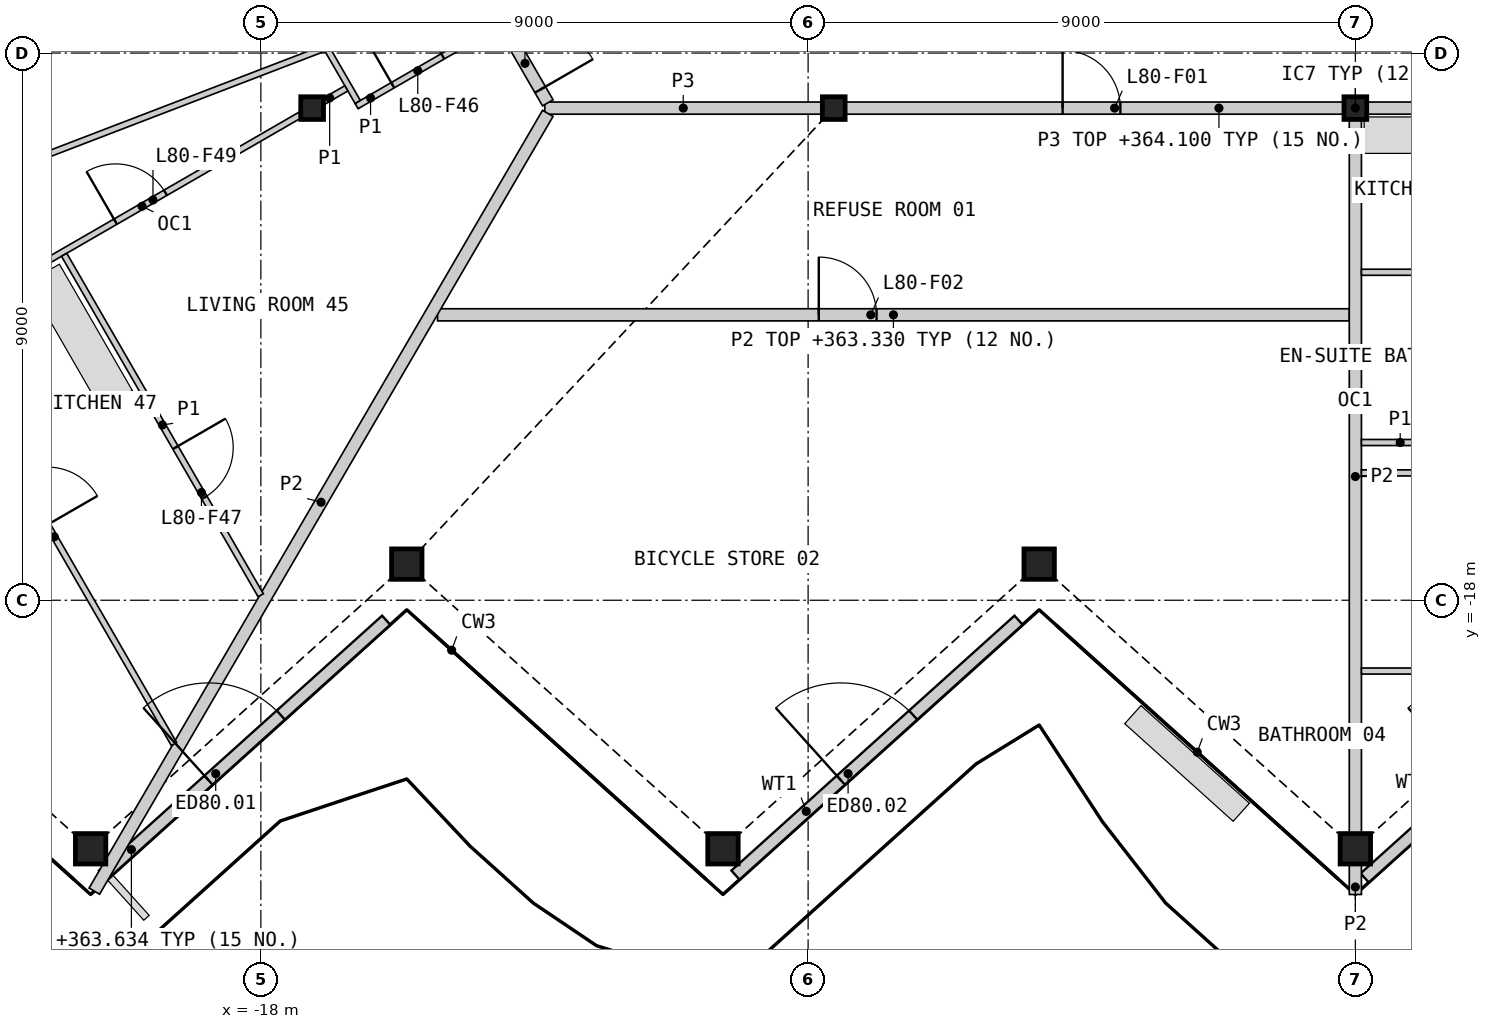
"""IFC4 building model, lengths in metres.
Left out: names, types, materials, properties, quantities, classifications, styles, units other than length and angle.
Written with IfcOpenShell. Run it as: python <this file> out.ifc"""

import sys

from ifc_helpers import new_model, si_unit, direction, frame, frame_2d, origin, origin_2d, place, context, subcontext, project, spatial, rectangle, hollow_rectangle, i_section, extrude, element, fill, save


model = new_model("IFC4")
c1 = context("Model", 3, precision=1e-05, world=origin(), true_north=direction((0.0, 1.0)))
c2 = subcontext(c1, "Body", "Model", "MODEL_VIEW")
j1 = project(units=[si_unit("LENGTHUNIT", "METRE"), si_unit("PLANEANGLEUNIT", "RADIAN")], contexts=[c1])
p1 = place(None, origin())
s1 = spatial("IfcSite", under=j1, at=p1, CompositionType="ELEMENT")
p2 = place(p1, origin())
s2 = spatial("IfcBuilding", under=s1, at=p2, CompositionType="ELEMENT")
p3 = place(p2, frame((0.0, 0.0, 361.0)))
s3 = spatial("IfcBuildingStorey", under=s2, at=p3, CompositionType="ELEMENT", Elevation=361.0)
for number, where, z_axis, x_axis in (
    (1, (-20.8, -22.088, 0.0), (0.0, 0.0, 1.0), (1.0, 0.0, 0.0)),
    (2, (-15.6, -17.406, 0.0), (0.0, 0.0, 1.0), (1.0, 0.0, 0.0)),
    (3, (-10.4, -22.088, 0.0), (0.0, 0.0, 1.0), (1.0, 0.0, 0.0)),
    (4, (-5.2, -17.406, 0.0), (0.0, 0.0, 1.0), (1.0, 0.0, 0.0)),
    (5, (0.0, -22.088, 0.0), (0.0, 0.0, 1.0), (1.0, 0.0, 0.0)),
):
    element("IfcColumn", number, at=place(p3, frame(where, z_axis=z_axis, x_axis=x_axis)), inside=s3, PredefinedType="COLUMN", context=c2, shape_type="SweptSolid", body=[
        extrude(hollow_rectangle(XDim=0.5, YDim=0.5, WallThickness=0.03, at=origin_2d()), origin(), (0.0, 0.0, 1.0), 3.4),
    ])
for number, where, z_axis, x_axis in (
    (6, (-17.157, -9.906, 0.0), (0.0, 0.0, 1.0), (1.0, 0.0, 0.0)),
    (7, (-8.578, -9.906, 0.0), (0.0, 0.0, 1.0), (1.0, 0.0, 0.0)),
    (8, (0.0, -9.906, 0.0), (0.0, 0.0, 1.0), (1.0, 0.0, 0.0)),
):
    element("IfcColumn", number, at=place(p3, frame(where, z_axis=z_axis, x_axis=x_axis)), inside=s3, PredefinedType="COLUMN", context=c2, shape_type="SweptSolid", body=[
        extrude(i_section(OverallWidth=0.374, OverallDepth=0.372, WebThickness=0.016, FlangeThickness=0.026, at=origin_2d()), origin(), (0.0, 0.0, 1.0), 3.4),
    ])
p4 = place(p3, frame((-20.595, -22.52, 0.0), z_axis=(0.0, 0.0, 1.0), x_axis=(0.743137181878, 0.669139095339, 0.0)))
e9 = element("IfcWall", 9, at=p4, inside=s3, PredefinedType="SOLIDWALL", context=c2, shape_type="SweptSolid", body=[
    extrude(rectangle(XDim=6.265, YDim=0.2, at=frame_2d((3.133, 0.0))), origin(), (0.0, 0.0, 1.0), 2.634),
])
p5 = place(p4, frame((2.333, 0.0, 0.0)))
e10 = element("IfcOpeningElement", 10, at=p5, cuts=e9, PredefinedType="OPENING", context=c2, shape_type="SweptSolid", body=[
    extrude(rectangle(XDim=1.6, YDim=2.25, at=frame_2d((0.8, 1.125))), frame((0.0, 0.11, 0.0), z_axis=(0.0, -1.0, 0.0), x_axis=(1.0, 0.0, 0.0)), (0.0, 0.0, 1.0), 0.22),
])
p6 = place(p3, frame((-10.195, -22.52, 0.0), z_axis=(0.0, 0.0, 1.0), x_axis=(0.743137181878, 0.669139095339, 0.0)))
e11 = element("IfcWall", 11, at=p6, inside=s3, PredefinedType="SOLIDWALL", context=c2, shape_type="SweptSolid", body=[
    extrude(rectangle(XDim=6.265, YDim=0.2, at=frame_2d((3.133, 0.0))), origin(), (0.0, 0.0, 1.0), 2.634),
])
p7 = place(p6, frame((2.333, 0.0, 0.0)))
e12 = element("IfcOpeningElement", 12, at=p7, cuts=e11, PredefinedType="OPENING", context=c2, shape_type="SweptSolid", body=[
    extrude(rectangle(XDim=1.6, YDim=2.25, at=frame_2d((0.8, 1.125))), frame((0.0, 0.11, 0.0), z_axis=(0.0, -1.0, 0.0), x_axis=(1.0, 0.0, 0.0)), (0.0, 0.0, 1.0), 0.22),
])
p8 = place(p3, frame((0.154, -22.567, 0.0), z_axis=(0.0, 0.0, 1.0), x_axis=(0.743150529995, 0.669124270796, 0.0)))
e13 = element("IfcWall", 13, at=p8, inside=s3, PredefinedType="SOLIDWALL", context=c2, shape_type="SweptSolid", body=[
    extrude(rectangle(XDim=6.678, YDim=0.2, at=frame_2d((3.339, 0.0))), origin(), (0.0, 0.0, 1.0), 2.634),
])
p9 = place(p8, frame((2.402, 0.0, 0.0)))
e14 = element("IfcOpeningElement", 14, at=p9, cuts=e13, PredefinedType="OPENING", context=c2, shape_type="SweptSolid", body=[
    extrude(rectangle(XDim=1.6, YDim=2.25, at=frame_2d((0.8, 1.125))), frame((0.0, 0.11, 0.0), z_axis=(0.0, -1.0, 0.0), x_axis=(1.0, 0.0, 0.0)), (0.0, 0.0, 1.0), 0.22),
])
p10 = place(p3, frame((-8.382, -9.906, 0.0), z_axis=(0.0, 0.0, 1.0), x_axis=(1.0, 0.0, 0.0)))
e15 = element("IfcWall", 15, at=p10, inside=s3, PredefinedType="PARTITIONING", context=c2, shape_type="SweptSolid", body=[
    extrude(rectangle(XDim=8.185, YDim=0.2, at=frame_2d((4.092, 0.0))), origin(), (0.0, 0.0, 1.0), 3.1),
])
p11 = place(p10, frame((3.567, 0.0, 0.0)))
e16 = element("IfcOpeningElement", 16, at=p11, cuts=e15, PredefinedType="OPENING", context=c2, shape_type="SweptSolid", body=[
    extrude(rectangle(XDim=0.95, YDim=2.1, at=frame_2d((0.475, 1.05))), frame((0.0, 0.11, 0.0), z_axis=(0.0, -1.0, 0.0), x_axis=(1.0, 0.0, 0.0)), (0.0, 0.0, 1.0), 0.22),
])
p12 = place(p3, frame((0.197, -9.906, 0.0), z_axis=(0.0, 0.0, 1.0), x_axis=(1.0, 0.0, 0.0)))
e17 = element("IfcWall", 17, at=p12, inside=s3, PredefinedType="PARTITIONING", context=c2, shape_type="SweptSolid", body=[
    extrude(rectangle(XDim=8.185, YDim=0.2, at=frame_2d((4.092, 0.0))), origin(), (0.0, 0.0, 1.0), 3.1),
])
p13 = place(p12, frame((3.39, 0.0, 0.0)))
e18 = element("IfcOpeningElement", 18, at=p13, cuts=e17, PredefinedType="OPENING", context=c2, shape_type="SweptSolid", body=[
    extrude(rectangle(XDim=1.0, YDim=2.1, at=frame_2d((0.5, 1.05))), frame((0.0, 0.11, 0.0), z_axis=(0.0, -1.0, 0.0), x_axis=(1.0, 0.0, 0.0)), (0.0, 0.0, 1.0), 0.22),
])
p14 = place(p3, frame((-13.331, -9.906, 0.0), z_axis=(0.0, 0.0, 1.0), x_axis=(1.0, 0.0, 0.0)))
e19 = element("IfcWall", 19, at=p14, inside=s3, PredefinedType="PARTITIONING", context=c2, shape_type="SweptSolid", body=[
    extrude(rectangle(XDim=4.555, YDim=0.2, at=frame_2d((2.278, 0.0))), origin(), (0.0, 0.0, 1.0), 3.1),
])
p15 = place(p3, frame((-15.131, -6.614, 0.0), z_axis=(0.0, 0.0, 1.0), x_axis=(0.499948957823, -0.866054870994, 0.0)))
e20 = element("IfcWall", 20, at=p15, inside=s3, PredefinedType="PARTITIONING", context=c2, shape_type="SweptSolid", body=[
    extrude(rectangle(XDim=3.701, YDim=0.2, at=frame_2d((1.851, 0.0))), origin(), (0.0, 0.0, 1.0), 3.1),
])
p16 = place(p15, frame((2.451, 0.0, 0.0)))
e21 = element("IfcOpeningElement", 21, at=p16, cuts=e20, PredefinedType="OPENING", context=c2, shape_type="SweptSolid", body=[
    extrude(rectangle(XDim=1.0, YDim=2.1, at=frame_2d((0.5, 1.05))), frame((0.0, 0.11, 0.0), z_axis=(0.0, -1.0, 0.0), x_axis=(1.0, 0.0, 0.0)), (0.0, 0.0, 1.0), 0.22),
])
p17 = place(p3, frame((-15.094, -13.306, 0.0), z_axis=(0.0, 0.0, 1.0), x_axis=(1.0, 0.0, 0.0)))
e22 = element("IfcWall", 22, at=p17, inside=s3, PredefinedType="PARTITIONING", context=c2, shape_type="SweptSolid", body=[
    extrude(rectangle(XDim=14.994, YDim=0.2, at=frame_2d((7.497, 0.0))), origin(), (0.0, 0.0, 1.0), 2.33),
])
p18 = place(p17, frame((6.27, 0.0, 0.0)))
e23 = element("IfcOpeningElement", 23, at=p18, cuts=e22, PredefinedType="OPENING", context=c2, shape_type="SweptSolid", body=[
    extrude(rectangle(XDim=0.95, YDim=2.1, at=frame_2d((0.475, 1.05))), frame((0.0, 0.11, 0.0), z_axis=(0.0, -1.0, 0.0), x_axis=(1.0, 0.0, 0.0)), (0.0, 0.0, 1.0), 0.22),
])
p19 = place(p3, frame((-20.739, -22.784, 0.0), z_axis=(0.0, 0.0, 1.0), x_axis=(0.50362599185, 0.863921790635, 0.0)))
e24 = element("IfcWall", 24, at=p19, inside=s3, PredefinedType="PARTITIONING", context=c2, shape_type="SweptSolid", body=[
    extrude(rectangle(XDim=14.807, YDim=0.2, at=frame_2d((7.404, 0.0))), origin(), (0.0, 0.0, 1.0), 2.33),
])
p20 = place(p3, frame((0.0, -21.828, 0.0), z_axis=(0.0, 0.0, 1.0), x_axis=(0.0, 1.0, 0.0)))
e25 = element("IfcWall", 25, at=p20, inside=s3, PredefinedType="PARTITIONING", context=c2, shape_type="SweptSolid", body=[
    extrude(rectangle(XDim=11.725, YDim=0.2, at=frame_2d((5.863, 0.0))), origin(), (0.0, 0.0, 1.0), 2.33),
])
p21 = place(p3, frame((0.0, -22.839, 0.0), z_axis=(0.0, 0.0, 1.0), x_axis=(0.0, 1.0, 0.0)))
e26 = element("IfcWall", 26, at=p21, inside=s3, PredefinedType="PARTITIONING", context=c2, shape_type="SweptSolid", body=[
    extrude(rectangle(XDim=0.491, YDim=0.2, at=frame_2d((0.246, 0.0))), origin(), (0.0, 0.0, 1.0), 2.33),
])
p22 = place(p3, frame((-28.725, -13.438, 0.0), z_axis=(0.0, 0.0, 1.0), x_axis=(0.933580312145, 0.358368247444, 0.0)))
e27 = element("IfcWall", 27, at=p22, inside=s3, PredefinedType="PARTITIONING", context=c2, shape_type="SweptSolid", body=[
    extrude(rectangle(XDim=12.59, YDim=0.1, at=frame_2d((6.295, 0.0))), origin(), (0.0, 0.0, 1.0), 2.33),
])
p23 = place(p22, frame((6.171, 0.0, 0.0)))
e28 = element("IfcOpeningElement", 28, at=p23, cuts=e27, PredefinedType="OPENING", context=c2, shape_type="SweptSolid", body=[
    extrude(rectangle(XDim=0.95, YDim=2.1, at=frame_2d((0.475, 1.05))), frame((0.0, 0.06, 0.0), z_axis=(0.0, -1.0, 0.0), x_axis=(1.0, 0.0, 0.0)), (0.0, 0.0, 1.0), 0.12),
])
p24 = place(p3, frame((-26.777, -15.46, 0.0), z_axis=(0.0, 0.0, 1.0), x_axis=(0.866019680922, 0.500009912158, 0.0)))
e29 = element("IfcWall", 29, at=p24, inside=s3, PredefinedType="PARTITIONING", context=c2, shape_type="SweptSolid", body=[
    extrude(rectangle(XDim=10.881, YDim=0.1, at=frame_2d((5.44, 0.0))), origin(), (0.0, 0.0, 1.0), 2.33),
])
p25 = place(p24, frame((7.373, 0.0, 0.0)))
e30 = element("IfcOpeningElement", 30, at=p25, cuts=e29, PredefinedType="OPENING", context=c2, shape_type="SweptSolid", body=[
    extrude(rectangle(XDim=0.95, YDim=2.1, at=frame_2d((0.475, 1.05))), frame((0.0, 0.06, 0.0), z_axis=(0.0, -1.0, 0.0), x_axis=(1.0, 0.0, 0.0)), (0.0, 0.0, 1.0), 0.12),
])
p26 = place(p3, frame((-23.365, -13.548, 0.0), z_axis=(0.0, 0.0, 1.0), x_axis=(0.500011483804, -0.866018773506, 0.0)))
e31 = element("IfcWall", 31, at=p26, inside=s3, PredefinedType="PARTITIONING", context=c2, shape_type="SweptSolid", body=[
    extrude(rectangle(XDim=7.872, YDim=0.1, at=frame_2d((3.936, 0.0))), origin(), (0.0, 0.0, 1.0), 2.33),
])
p27 = place(p26, frame((2.759, 0.0, 0.0)))
e32 = element("IfcOpeningElement", 32, at=p27, cuts=e31, PredefinedType="OPENING", context=c2, shape_type="SweptSolid", body=[
    extrude(rectangle(XDim=0.95, YDim=2.1, at=frame_2d((0.475, 1.05))), frame((0.0, 0.06, 0.0), z_axis=(0.0, -1.0, 0.0), x_axis=(1.0, 0.0, 0.0)), (0.0, 0.0, 1.0), 0.12),
])
p28 = place(p3, frame((-21.235, -12.318, 0.0), z_axis=(0.0, 0.0, 1.0), x_axis=(0.500008973052, -0.866020223129, 0.0)))
e33 = element("IfcWall", 33, at=p28, inside=s3, PredefinedType="PARTITIONING", context=c2, shape_type="SweptSolid", body=[
    extrude(rectangle(XDim=6.466, YDim=0.1, at=frame_2d((3.233, 0.0))), origin(), (0.0, 0.0, 1.0), 2.33),
])
p29 = place(p28, frame((3.661, 0.0, 0.0)))
e34 = element("IfcOpeningElement", 34, at=p29, cuts=e33, PredefinedType="OPENING", context=c2, shape_type="SweptSolid", body=[
    extrude(rectangle(XDim=0.95, YDim=2.1, at=frame_2d((0.475, 1.05))), frame((0.0, 0.06, 0.0), z_axis=(0.0, -1.0, 0.0), x_axis=(1.0, 0.0, 0.0)), (0.0, 0.0, 1.0), 0.12),
])
p30 = place(p3, frame((0.1, -19.164, 0.0), z_axis=(0.0, 0.0, 1.0), x_axis=(1.0, 0.0, 0.0)))
e35 = element("IfcWall", 35, at=p30, inside=s3, PredefinedType="PARTITIONING", context=c2, shape_type="SweptSolid", body=[
    extrude(rectangle(XDim=3.751, YDim=0.1, at=frame_2d((1.876, 0.0))), origin(), (0.0, 0.0, 1.0), 2.33),
])
p31 = place(p30, frame((2.579, 0.0, 0.0)))
e36 = element("IfcOpeningElement", 36, at=p31, cuts=e35, PredefinedType="OPENING", context=c2, shape_type="SweptSolid", body=[
    extrude(rectangle(XDim=0.95, YDim=2.1, at=frame_2d((0.475, 1.05))), frame((0.0, 0.06, 0.0), z_axis=(0.0, -1.0, 0.0), x_axis=(1.0, 0.0, 0.0)), (0.0, 0.0, 1.0), 0.12),
])
p32 = place(p3, frame((0.1, -15.906, 0.0), z_axis=(0.0, 0.0, 1.0), x_axis=(1.0, 0.0, 0.0)))
e37 = element("IfcWall", 37, at=p32, inside=s3, PredefinedType="PARTITIONING", context=c2, shape_type="SweptSolid", body=[
    extrude(rectangle(XDim=2.85, YDim=0.1, at=frame_2d((1.425, 0.0))), origin(), (0.0, 0.0, 1.0), 2.33),
])
p33 = place(p3, frame((0.1, -12.606, 0.0), z_axis=(0.0, 0.0, 1.0), x_axis=(1.0, 0.0, 0.0)))
e38 = element("IfcWall", 38, at=p33, inside=s3, PredefinedType="PARTITIONING", context=c2, shape_type="SweptSolid", body=[
    extrude(rectangle(XDim=2.55, YDim=0.1, at=frame_2d((1.275, 0.0))), origin(), (0.0, 0.0, 1.0), 2.33),
])
p34 = place(p3, frame((0.1, -15.406, 0.0), z_axis=(0.0, 0.0, 1.0), x_axis=(1.0, 0.0, 0.0)))
e39 = element("IfcWall", 39, at=p34, inside=s3, PredefinedType="PARTITIONING", context=c2, shape_type="SweptSolid", body=[
    extrude(rectangle(XDim=2.55, YDim=0.1, at=frame_2d((1.275, 0.0))), origin(), (0.0, 0.0, 1.0), 2.33),
])
p35 = place(p34, frame((1.35, 0.0, 0.0)))
e40 = element("IfcOpeningElement", 40, at=p35, cuts=e39, PredefinedType="OPENING", context=c2, shape_type="SweptSolid", body=[
    extrude(rectangle(XDim=0.95, YDim=2.1, at=frame_2d((0.475, 1.05))), frame((0.0, 0.06, 0.0), z_axis=(0.0, -1.0, 0.0), x_axis=(1.0, 0.0, 0.0)), (0.0, 0.0, 1.0), 0.12),
])
p36 = place(p3, frame((-16.426, -9.872, 0.0), z_axis=(0.0, 0.0, 1.0), x_axis=(0.866029095148, 0.499993606316, 0.0)))
e41 = element("IfcWall", 41, at=p36, inside=s3, PredefinedType="PARTITIONING", context=c2, shape_type="SweptSolid", body=[
    extrude(rectangle(XDim=2.65, YDim=0.1, at=frame_2d((1.325, 0.0))), origin(), (0.0, 0.0, 1.0), 2.33),
])
p37 = place(p36, frame((0.686, 0.0, 0.0)))
e42 = element("IfcOpeningElement", 42, at=p37, cuts=e41, PredefinedType="OPENING", context=c2, shape_type="SweptSolid", body=[
    extrude(rectangle(XDim=0.95, YDim=2.1, at=frame_2d((0.475, 1.05))), frame((0.0, 0.06, 0.0), z_axis=(0.0, -1.0, 0.0), x_axis=(1.0, 0.0, 0.0)), (0.0, 0.0, 1.0), 0.12),
])
p38 = place(p3, frame((-17.507, -7.899, 0.0), z_axis=(0.0, 0.0, 1.0), x_axis=(0.499946605688, -0.86605622881, 0.0)))
e43 = element("IfcWall", 43, at=p38, inside=s3, PredefinedType="PARTITIONING", context=c2, shape_type="SweptSolid", body=[
    extrude(rectangle(XDim=2.2, YDim=0.1, at=frame_2d((1.1, 0.0))), origin(), (0.0, 0.0, 1.0), 2.33),
])
p39 = place(p3, frame((-16.96, -9.792, 0.0), z_axis=(0.0, 0.0, 1.0), x_axis=(0.866137484628, 0.499805820016, 0.0)))
e44 = element("IfcWall", 44, at=p39, inside=s3, PredefinedType="PARTITIONING", context=c2, shape_type="SweptSolid", body=[
    extrude(rectangle(XDim=0.423, YDim=0.1, at=frame_2d((0.211, 0.0))), origin(), (0.0, 0.0, 1.0), 2.33),
])
p40 = place(p5, origin())
e45 = element("IfcDoor", 45, at=p40, inside=s3, OperationType="DOUBLE_DOOR_SINGLE_SWING", PredefinedType="DOOR", context=c2, shape_type="SweptSolid", body=[
    extrude(rectangle(XDim=1.6, YDim=2.25, at=frame_2d((0.8, 1.125))), frame((0.0, 0.025, 0.0), z_axis=(0.0, -1.0, 0.0), x_axis=(1.0, 0.0, 0.0)), (0.0, 0.0, 1.0), 0.05),
])
fill(e10, e45)
p41 = place(p7, origin())
e46 = element("IfcDoor", 46, at=p41, inside=s3, OperationType="DOUBLE_DOOR_SINGLE_SWING", PredefinedType="DOOR", context=c2, shape_type="SweptSolid", body=[
    extrude(rectangle(XDim=1.6, YDim=2.25, at=frame_2d((0.8, 1.125))), frame((0.0, 0.025, 0.0), z_axis=(0.0, -1.0, 0.0), x_axis=(1.0, 0.0, 0.0)), (0.0, 0.0, 1.0), 0.05),
])
fill(e12, e46)
p42 = place(p11, origin())
e47 = element("IfcDoor", 47, at=p42, inside=s3, OperationType="SINGLE_SWING_LEFT", PredefinedType="DOOR", context=c2, shape_type="SweptSolid", body=[
    extrude(rectangle(XDim=0.95, YDim=2.1, at=frame_2d((0.475, 1.05))), frame((0.0, 0.025, 0.0), z_axis=(0.0, -1.0, 0.0), x_axis=(1.0, 0.0, 0.0)), (0.0, 0.0, 1.0), 0.05),
])
fill(e16, e47)
p43 = place(p18, origin())
e48 = element("IfcDoor", 48, at=p43, inside=s3, OperationType="SINGLE_SWING_LEFT", PredefinedType="DOOR", context=c2, shape_type="SweptSolid", body=[
    extrude(rectangle(XDim=0.95, YDim=2.1, at=frame_2d((0.475, 1.05))), frame((0.0, 0.025, 0.0), z_axis=(0.0, -1.0, 0.0), x_axis=(1.0, 0.0, 0.0)), (0.0, 0.0, 1.0), 0.05),
])
fill(e23, e48)
p44 = place(p16, origin())
e49 = element("IfcDoor", 49, at=p44, inside=s3, OperationType="SINGLE_SWING_RIGHT", PredefinedType="DOOR", context=c2, shape_type="SweptSolid", body=[
    extrude(rectangle(XDim=1.0, YDim=2.1, at=frame_2d((0.5, 1.05))), frame((0.0, 0.025, 0.0), z_axis=(0.0, -1.0, 0.0), x_axis=(1.0, 0.0, 0.0)), (0.0, 0.0, 1.0), 0.05),
])
fill(e21, e49)
p45 = place(p37, origin())
e50 = element("IfcDoor", 50, at=p45, inside=s3, OperationType="SINGLE_SWING_LEFT", PredefinedType="DOOR", context=c2, shape_type="SweptSolid", body=[
    extrude(rectangle(XDim=0.95, YDim=2.1, at=frame_2d((0.475, 1.05))), frame((0.0, 0.025, 0.0), z_axis=(0.0, -1.0, 0.0), x_axis=(1.0, 0.0, 0.0)), (0.0, 0.0, 1.0), 0.05),
])
fill(e42, e50)
p46 = place(p29, origin())
e51 = element("IfcDoor", 51, at=p46, inside=s3, OperationType="SINGLE_SWING_LEFT", PredefinedType="DOOR", context=c2, shape_type="SweptSolid", body=[
    extrude(rectangle(XDim=0.95, YDim=2.1, at=frame_2d((0.475, 1.05))), frame((0.0, 0.025, 0.0), z_axis=(0.0, -1.0, 0.0), x_axis=(1.0, 0.0, 0.0)), (0.0, 0.0, 1.0), 0.05),
])
fill(e34, e51)
p47 = place(p25, origin())
e52 = element("IfcDoor", 52, at=p47, inside=s3, OperationType="SINGLE_SWING_LEFT", PredefinedType="DOOR", context=c2, shape_type="SweptSolid", body=[
    extrude(rectangle(XDim=0.95, YDim=2.1, at=frame_2d((0.475, 1.05))), frame((0.0, 0.025, 0.0), z_axis=(0.0, -1.0, 0.0), x_axis=(1.0, 0.0, 0.0)), (0.0, 0.0, 1.0), 0.05),
])
fill(e30, e52)
save(model, sys.argv[1])
